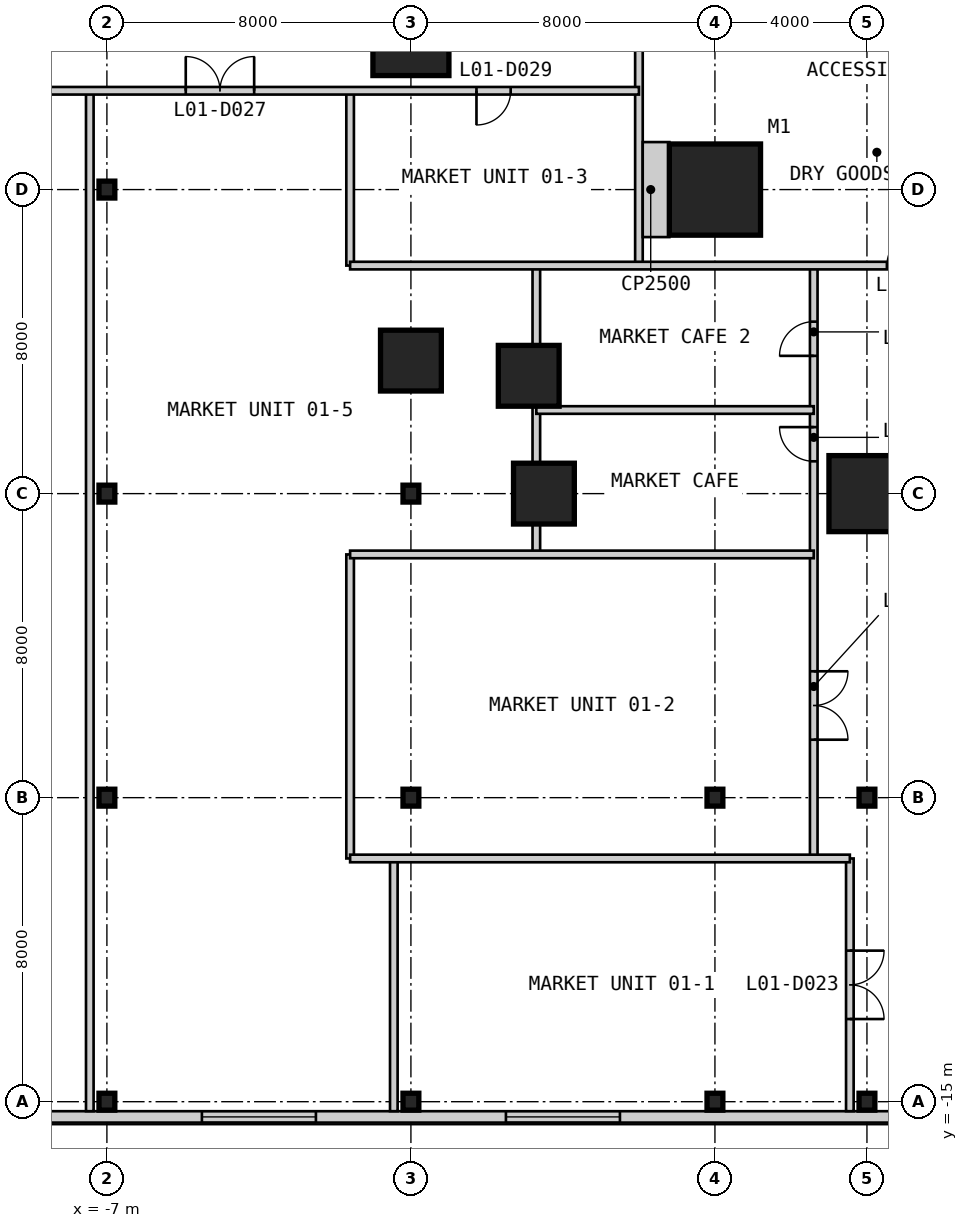
"""IFC4 building model, lengths in metres.
Left out: names, types, materials, properties, quantities, classifications, styles, units other than length and angle.
Written with IfcOpenShell. Run it as: python <this file> out.ifc"""

import sys

from ifc_helpers import new_model, si_unit, direction, frame, frame_2d, origin, origin_2d, place, context, subcontext, project, spatial, rectangle, i_section, extrude, element, fill, save


model = new_model("IFC4")
c1 = context("Model", 3, precision=1e-05, world=origin(), true_north=direction((0.0, 1.0)))
c2 = subcontext(c1, "Body", "Model", "MODEL_VIEW")
j1 = project(units=[si_unit("LENGTHUNIT", "METRE"), si_unit("PLANEANGLEUNIT", "RADIAN")], contexts=[c1])
p1 = place(None, origin())
s1 = spatial("IfcSite", under=j1, at=p1, CompositionType="ELEMENT")
p2 = place(p1, origin())
s2 = spatial("IfcBuilding", under=s1, at=p2, CompositionType="ELEMENT")
p3 = place(p2, frame((0.0, 0.0, 7.0)))
s3 = spatial("IfcBuildingStorey", under=s2, at=p3, CompositionType="ELEMENT", Elevation=7.0)
p4 = place(p3, frame((9.0, 9.0, 0.0), z_axis=(0.0, 0.0, 1.0), x_axis=(1.0, 0.0, 0.0)))
e1 = element("IfcColumn", 1, at=p4, inside=s3, PredefinedType="COLUMN", context=c2, shape_type="SweptSolid", body=[
    extrude(rectangle(XDim=2.4, YDim=2.4, at=origin_2d()), origin(), (0.0, 0.0, 1.0), 4.8),
])
p5 = place(p3, frame((4.5, 1.0, 0.0), z_axis=(0.0, 0.0, 1.0), x_axis=(1.0, 0.0, 0.0)))
e2 = element("IfcColumn", 2, at=p5, inside=s3, PredefinedType="COLUMN", context=c2, shape_type="SweptSolid", body=[
    extrude(rectangle(XDim=1.6, YDim=1.6, at=origin_2d()), origin(), (0.0, 0.0, 1.0), 4.8),
])
for number, where, z_axis, x_axis in (
    (3, (13.0, 1.0, 0.0), (0.0, 0.0, 1.0), (1.0, 0.0, 0.0)),
    (4, (1.0, 13.0, 0.0), (0.0, 0.0, 1.0), (1.0, 0.0, 0.0)),
):
    element("IfcColumn", number, at=place(p3, frame(where, z_axis=z_axis, x_axis=x_axis)), inside=s3, PredefinedType="COLUMN", context=c2, shape_type="SweptSolid", body=[
        extrude(rectangle(XDim=2.0, YDim=2.0, at=origin_2d()), origin(), (0.0, 0.0, 1.0), 4.8),
    ])
for number, where, z_axis, x_axis in (
    (5, (1.0, 4.5, 0.0), (0.0, 0.0, 1.0), (1.0, 0.0, 0.0)),
    (6, (4.1, 4.1, 0.0), (0.0, 0.0, 1.0), (1.0, 0.0, 0.0)),
):
    element("IfcColumn", number, at=place(p3, frame(where, z_axis=z_axis, x_axis=x_axis)), inside=s3, PredefinedType="COLUMN", context=c2, shape_type="SweptSolid", body=[
        extrude(rectangle(XDim=1.6, YDim=1.6, at=origin_2d()), origin(), (0.0, 0.0, 1.0), 4.8),
    ])
for number, where, z_axis, x_axis in (
    (7, (-7.0, -15.0, 0.0), (0.0, 0.0, 1.0), (1.0, 0.0, 0.0)),
    (8, (-7.0, -7.0, 0.0), (0.0, 0.0, 1.0), (1.0, 0.0, 0.0)),
    (9, (-7.0, 1.0, 0.0), (0.0, 0.0, 1.0), (1.0, 0.0, 0.0)),
    (10, (-7.0, 9.0, 0.0), (0.0, 0.0, 1.0), (1.0, 0.0, 0.0)),
    (11, (1.0, -15.0, 0.0), (0.0, 0.0, 1.0), (1.0, 0.0, 0.0)),
    (12, (1.0, -7.0, 0.0), (0.0, 0.0, 1.0), (1.0, 0.0, 0.0)),
    (13, (1.0, 1.0, 0.0), (0.0, 0.0, 1.0), (1.0, 0.0, 0.0)),
    (14, (9.0, -15.0, 0.0), (0.0, 0.0, 1.0), (1.0, 0.0, 0.0)),
    (15, (9.0, -7.0, 0.0), (0.0, 0.0, 1.0), (1.0, 0.0, 0.0)),
    (16, (13.0, -15.0, 0.0), (0.0, 0.0, 1.0), (1.0, 0.0, 0.0)),
    (17, (13.0, -7.0, 0.0), (0.0, 0.0, 1.0), (1.0, 0.0, 0.0)),
):
    element("IfcColumn", number, at=place(p3, frame(where, z_axis=z_axis, x_axis=x_axis)), inside=s3, PredefinedType="COLUMN", context=c2, shape_type="SweptSolid", body=[
        extrude(i_section(OverallWidth=0.417, OverallDepth=0.445, WebThickness=0.039, FlangeThickness=0.063, at=origin_2d()), origin(), (0.0, 0.0, 1.0), 4.8),
    ])
p6 = place(p3, frame((-15.55, -15.4, 0.0), z_axis=(0.0, 0.0, 1.0), x_axis=(1.0, 0.0, 0.0)))
e18 = element("IfcWall", 18, at=p6, inside=s3, PredefinedType="SOLIDWALL", context=c2, shape_type="SweptSolid", body=[
    extrude(rectangle(XDim=81.1, YDim=0.3, at=frame_2d((40.55, 0.0))), origin(), (0.0, 0.0, 1.0), 4.5),
])
p7 = place(p6, frame((3.05, 0.0, 0.9)))
e19 = element("IfcOpeningElement", 19, at=p7, cuts=e18, PredefinedType="OPENING", context=c2, shape_type="SweptSolid", body=[
    extrude(rectangle(XDim=3.0, YDim=2.4, at=frame_2d((1.5, 1.2))), frame((0.0, 0.16, 0.0), z_axis=(0.0, -1.0, 0.0), x_axis=(1.0, 0.0, 0.0)), (0.0, 0.0, 1.0), 0.32),
])
p8 = place(p6, frame((11.05, 0.0, 0.9)))
e20 = element("IfcOpeningElement", 20, at=p8, cuts=e18, PredefinedType="OPENING", context=c2, shape_type="SweptSolid", body=[
    extrude(rectangle(XDim=3.0, YDim=2.4, at=frame_2d((1.5, 1.2))), frame((0.0, 0.16, 0.0), z_axis=(0.0, -1.0, 0.0), x_axis=(1.0, 0.0, 0.0)), (0.0, 0.0, 1.0), 0.32),
])
p9 = place(p6, frame((19.05, 0.0, 0.9)))
e21 = element("IfcOpeningElement", 21, at=p9, cuts=e18, PredefinedType="OPENING", context=c2, shape_type="SweptSolid", body=[
    extrude(rectangle(XDim=3.0, YDim=2.4, at=frame_2d((1.5, 1.2))), frame((0.0, 0.16, 0.0), z_axis=(0.0, -1.0, 0.0), x_axis=(1.0, 0.0, 0.0)), (0.0, 0.0, 1.0), 0.32),
])
p10 = place(p6, frame((33.05, 0.0, 0.9)))
e22 = element("IfcOpeningElement", 22, at=p10, cuts=e18, PredefinedType="OPENING", context=c2, shape_type="SweptSolid", body=[
    extrude(rectangle(XDim=3.0, YDim=2.4, at=frame_2d((1.5, 1.2))), frame((0.0, 0.16, 0.0), z_axis=(0.0, -1.0, 0.0), x_axis=(1.0, 0.0, 0.0)), (0.0, 0.0, 1.0), 0.32),
])
p11 = place(p6, frame((45.05, 0.0, 0.9)))
e23 = element("IfcOpeningElement", 23, at=p11, cuts=e18, PredefinedType="OPENING", context=c2, shape_type="SweptSolid", body=[
    extrude(rectangle(XDim=3.0, YDim=2.4, at=frame_2d((1.5, 1.2))), frame((0.0, 0.16, 0.0), z_axis=(0.0, -1.0, 0.0), x_axis=(1.0, 0.0, 0.0)), (0.0, 0.0, 1.0), 0.32),
])
p12 = place(p6, frame((53.55, 0.0, 0.9)))
e24 = element("IfcOpeningElement", 24, at=p12, cuts=e18, PredefinedType="OPENING", context=c2, shape_type="SweptSolid", body=[
    extrude(rectangle(XDim=3.0, YDim=2.4, at=frame_2d((1.5, 1.2))), frame((0.0, 0.16, 0.0), z_axis=(0.0, -1.0, 0.0), x_axis=(1.0, 0.0, 0.0)), (0.0, 0.0, 1.0), 0.32),
])
p13 = place(p6, frame((59.55, 0.0, 0.9)))
e25 = element("IfcOpeningElement", 25, at=p13, cuts=e18, PredefinedType="OPENING", context=c2, shape_type="SweptSolid", body=[
    extrude(rectangle(XDim=3.0, YDim=2.4, at=frame_2d((1.5, 1.2))), frame((0.0, 0.16, 0.0), z_axis=(0.0, -1.0, 0.0), x_axis=(1.0, 0.0, 0.0)), (0.0, 0.0, 1.0), 0.32),
])
p14 = place(p6, frame((67.05, 0.0, 0.9)))
e26 = element("IfcOpeningElement", 26, at=p14, cuts=e18, PredefinedType="OPENING", context=c2, shape_type="SweptSolid", body=[
    extrude(rectangle(XDim=3.0, YDim=2.4, at=frame_2d((1.5, 1.2))), frame((0.0, 0.16, 0.0), z_axis=(0.0, -1.0, 0.0), x_axis=(1.0, 0.0, 0.0)), (0.0, 0.0, 1.0), 0.32),
])
p15 = place(p6, frame((75.05, 0.0, 0.9)))
e27 = element("IfcOpeningElement", 27, at=p15, cuts=e18, PredefinedType="OPENING", context=c2, shape_type="SweptSolid", body=[
    extrude(rectangle(XDim=3.0, YDim=2.4, at=frame_2d((1.5, 1.2))), frame((0.0, 0.16, 0.0), z_axis=(0.0, -1.0, 0.0), x_axis=(1.0, 0.0, 0.0)), (0.0, 0.0, 1.0), 0.32),
])
p16 = place(p3, frame((-7.45, -15.25, 0.0), z_axis=(0.0, 0.0, 1.0), x_axis=(0.0, 1.0, 0.0)))
e28 = element("IfcWall", 28, at=p16, inside=s3, PredefinedType="PARTITIONING", context=c2, shape_type="SweptSolid", body=[
    extrude(rectangle(XDim=26.85, YDim=0.2, at=frame_2d((13.425, 0.0))), origin(), (0.0, 0.0, 1.0), 4.5),
])
p17 = place(p3, frame((-0.6, -8.6, 0.0), z_axis=(0.0, 0.0, 1.0), x_axis=(0.0, 1.0, 0.0)))
e29 = element("IfcWall", 29, at=p17, inside=s3, PredefinedType="PARTITIONING", context=c2, shape_type="SweptSolid", body=[
    extrude(rectangle(XDim=8.0, YDim=0.2, at=frame_2d((4.0, 0.0))), origin(), (0.0, 0.0, 1.0), 4.5),
])
p18 = place(p3, frame((-0.6, 7.0, 0.0), z_axis=(0.0, 0.0, 1.0), x_axis=(0.0, 1.0, 0.0)))
e30 = element("IfcWall", 30, at=p18, inside=s3, PredefinedType="PARTITIONING", context=c2, shape_type="SweptSolid", body=[
    extrude(rectangle(XDim=4.6, YDim=0.2, at=frame_2d((2.3, 0.0))), origin(), (0.0, 0.0, 1.0), 4.5),
])
p19 = place(p3, frame((0.55, -15.25, 0.0), z_axis=(0.0, 0.0, 1.0), x_axis=(0.0, 1.0, 0.0)))
e31 = element("IfcWall", 31, at=p19, inside=s3, PredefinedType="PARTITIONING", context=c2, shape_type="SweptSolid", body=[
    extrude(rectangle(XDim=6.65, YDim=0.2, at=frame_2d((3.325, 0.0))), origin(), (0.0, 0.0, 1.0), 4.5),
])
p20 = place(p3, frame((4.3, -0.6, 0.0), z_axis=(0.0, 0.0, 1.0), x_axis=(0.0, 1.0, 0.0)))
e32 = element("IfcWall", 32, at=p20, inside=s3, PredefinedType="PARTITIONING", context=c2, shape_type="SweptSolid", body=[
    extrude(rectangle(XDim=0.8, YDim=0.2, at=frame_2d((0.4, 0.0))), origin(), (0.0, 0.0, 1.0), 4.5),
])
p21 = place(p3, frame((4.3, 1.8, 0.0), z_axis=(0.0, 0.0, 1.0), x_axis=(0.0, 1.0, 0.0)))
e33 = element("IfcWall", 33, at=p21, inside=s3, PredefinedType="PARTITIONING", context=c2, shape_type="SweptSolid", body=[
    extrude(rectangle(XDim=1.5, YDim=0.2, at=frame_2d((0.75, 0.0))), origin(), (0.0, 0.0, 1.0), 3.65),
])
p22 = place(p3, frame((4.3, 4.9, 0.0), z_axis=(0.0, 0.0, 1.0), x_axis=(0.0, 1.0, 0.0)))
e34 = element("IfcWall", 34, at=p22, inside=s3, PredefinedType="PARTITIONING", context=c2, shape_type="SweptSolid", body=[
    extrude(rectangle(XDim=2.1, YDim=0.2, at=frame_2d((1.05, 0.0))), origin(), (0.0, 0.0, 1.0), 4.5),
])
p23 = place(p3, frame((7.0, 7.0, 0.0), z_axis=(0.0, 0.0, 1.0), x_axis=(0.0, 1.0, 0.0)))
e35 = element("IfcWall", 35, at=p23, inside=s3, PredefinedType="PARTITIONING", context=c2, shape_type="SweptSolid", body=[
    extrude(rectangle(XDim=6.0, YDim=0.2, at=frame_2d((3.0, 0.0))), origin(), (0.0, 0.0, 1.0), 4.5),
])
p24 = place(p3, frame((11.6, -8.6, 0.0), z_axis=(0.0, 0.0, 1.0), x_axis=(0.0, 1.0, 0.0)))
e36 = element("IfcWall", 36, at=p24, inside=s3, PredefinedType="PARTITIONING", context=c2, shape_type="SweptSolid", body=[
    extrude(rectangle(XDim=15.6, YDim=0.2, at=frame_2d((7.8, 0.0))), origin(), (0.0, 0.0, 1.0), 4.5),
])
p25 = place(p24, frame((3.125, 0.0, 0.0)))
e37 = element("IfcOpeningElement", 37, at=p25, cuts=e36, PredefinedType="OPENING", context=c2, shape_type="SweptSolid", body=[
    extrude(rectangle(XDim=1.8, YDim=2.4, at=frame_2d((0.9, 1.2))), frame((0.0, 0.11, 0.0), z_axis=(0.0, -1.0, 0.0), x_axis=(1.0, 0.0, 0.0)), (0.0, 0.0, 1.0), 0.22),
])
p26 = place(p24, frame((10.45, 0.0, 0.0)))
e38 = element("IfcOpeningElement", 38, at=p26, cuts=e36, PredefinedType="OPENING", context=c2, shape_type="SweptSolid", body=[
    extrude(rectangle(XDim=0.9, YDim=2.2, at=frame_2d((0.45, 1.1))), frame((0.0, 0.11, 0.0), z_axis=(0.0, -1.0, 0.0), x_axis=(1.0, 0.0, 0.0)), (0.0, 0.0, 1.0), 0.22),
])
p27 = place(p24, frame((13.225, 0.0, 0.0)))
e39 = element("IfcOpeningElement", 39, at=p27, cuts=e36, PredefinedType="OPENING", context=c2, shape_type="SweptSolid", body=[
    extrude(rectangle(XDim=0.9, YDim=2.2, at=frame_2d((0.45, 1.1))), frame((0.0, 0.11, 0.0), z_axis=(0.0, -1.0, 0.0), x_axis=(1.0, 0.0, 0.0)), (0.0, 0.0, 1.0), 0.22),
])
p28 = place(p3, frame((12.55, -15.25, 0.0), z_axis=(0.0, 0.0, 1.0), x_axis=(0.0, 1.0, 0.0)))
e40 = element("IfcWall", 40, at=p28, inside=s3, PredefinedType="PARTITIONING", context=c2, shape_type="SweptSolid", body=[
    extrude(rectangle(XDim=6.65, YDim=0.2, at=frame_2d((3.325, 0.0))), origin(), (0.0, 0.0, 1.0), 4.5),
])
p29 = place(p28, frame((2.425, 0.0, 0.0)))
e41 = element("IfcOpeningElement", 41, at=p29, cuts=e40, PredefinedType="OPENING", context=c2, shape_type="SweptSolid", body=[
    extrude(rectangle(XDim=1.8, YDim=2.4, at=frame_2d((0.9, 1.2))), frame((0.0, 0.11, 0.0), z_axis=(0.0, -1.0, 0.0), x_axis=(1.0, 0.0, 0.0)), (0.0, 0.0, 1.0), 0.22),
])
p30 = place(p3, frame((-0.6, -8.6, 0.0), z_axis=(0.0, 0.0, 1.0), x_axis=(1.0, 0.0, 0.0)))
e42 = element("IfcWall", 42, at=p30, inside=s3, PredefinedType="PARTITIONING", context=c2, shape_type="SweptSolid", body=[
    extrude(rectangle(XDim=13.15, YDim=0.2, at=frame_2d((6.575, 0.0))), origin(), (0.0, 0.0, 1.0), 4.5),
])
p31 = place(p3, frame((-0.6, -0.6, 0.0), z_axis=(0.0, 0.0, 1.0), x_axis=(1.0, 0.0, 0.0)))
e43 = element("IfcWall", 43, at=p31, inside=s3, PredefinedType="PARTITIONING", context=c2, shape_type="SweptSolid", body=[
    extrude(rectangle(XDim=12.2, YDim=0.2, at=frame_2d((6.1, 0.0))), origin(), (0.0, 0.0, 1.0), 4.5),
])
p32 = place(p3, frame((4.3, 3.2, 0.0), z_axis=(0.0, 0.0, 1.0), x_axis=(1.0, 0.0, 0.0)))
e44 = element("IfcWall", 44, at=p32, inside=s3, PredefinedType="PARTITIONING", context=c2, shape_type="SweptSolid", body=[
    extrude(rectangle(XDim=7.3, YDim=0.2, at=frame_2d((3.65, 0.0))), origin(), (0.0, 0.0, 1.0), 4.5),
])
p33 = place(p3, frame((-0.6, 7.0, 0.0), z_axis=(0.0, 0.0, 1.0), x_axis=(1.0, 0.0, 0.0)))
e45 = element("IfcWall", 45, at=p33, inside=s3, PredefinedType="PARTITIONING", context=c2, shape_type="SweptSolid", body=[
    extrude(rectangle(XDim=17.0, YDim=0.2, at=frame_2d((8.5, 0.0))), origin(), (0.0, 0.0, 1.0), 4.5),
])
p34 = place(p33, frame((14.125, 0.0, 0.0)))
e46 = element("IfcOpeningElement", 46, at=p34, cuts=e45, PredefinedType="OPENING", context=c2, shape_type="SweptSolid", body=[
    extrude(rectangle(XDim=0.9, YDim=2.2, at=frame_2d((0.45, 1.1))), frame((0.0, 0.11, 0.0), z_axis=(0.0, -1.0, 0.0), x_axis=(1.0, 0.0, 0.0)), (0.0, 0.0, 1.0), 0.22),
])
p35 = place(p3, frame((-15.25, 11.6, 0.0), z_axis=(0.0, 0.0, 1.0), x_axis=(1.0, 0.0, 0.0)))
e47 = element("IfcWall", 47, at=p35, inside=s3, PredefinedType="PARTITIONING", context=c2, shape_type="SweptSolid", body=[
    extrude(rectangle(XDim=22.25, YDim=0.2, at=frame_2d((11.125, 0.0))), origin(), (0.0, 0.0, 1.0), 4.5),
])
p36 = place(p35, frame((10.325, 0.0, 0.0)))
e48 = element("IfcOpeningElement", 48, at=p36, cuts=e47, PredefinedType="OPENING", context=c2, shape_type="SweptSolid", body=[
    extrude(rectangle(XDim=1.8, YDim=2.4, at=frame_2d((0.9, 1.2))), frame((0.0, 0.11, 0.0), z_axis=(0.0, -1.0, 0.0), x_axis=(1.0, 0.0, 0.0)), (0.0, 0.0, 1.0), 0.22),
])
p37 = place(p35, frame((3.025, 0.0, 0.0)))
e49 = element("IfcOpeningElement", 49, at=p37, cuts=e47, PredefinedType="OPENING", context=c2, shape_type="SweptSolid", body=[
    extrude(rectangle(XDim=1.8, YDim=2.4, at=frame_2d((0.9, 1.2))), frame((0.0, 0.11, 0.0), z_axis=(0.0, -1.0, 0.0), x_axis=(1.0, 0.0, 0.0)), (0.0, 0.0, 1.0), 0.22),
])
p38 = place(p35, frame((17.975, 0.0, 0.0)))
e50 = element("IfcOpeningElement", 50, at=p38, cuts=e47, PredefinedType="OPENING", context=c2, shape_type="SweptSolid", body=[
    extrude(rectangle(XDim=0.9, YDim=2.2, at=frame_2d((0.45, 1.1))), frame((0.0, 0.11, 0.0), z_axis=(0.0, -1.0, 0.0), x_axis=(1.0, 0.0, 0.0)), (0.0, 0.0, 1.0), 0.22),
])
p39 = place(p3, frame((7.1, 9.0, 0.0), z_axis=(0.0, 0.0, 1.0), x_axis=(1.0, 0.0, 0.0)))
e51 = element("IfcWall", 51, at=p39, inside=s3, PredefinedType="PARTITIONING", context=c2, shape_type="SweptSolid", body=[
    extrude(rectangle(XDim=0.7, YDim=2.5, at=frame_2d((0.35, 0.0))), origin(), (0.0, 0.0, 1.0), 4.5),
])
p40 = place(p8, origin())
e52 = element("IfcWindow", 52, at=p40, inside=s3, PartitioningType="SINGLE_PANEL", PredefinedType="WINDOW", context=c2, shape_type="SweptSolid", body=[
    extrude(rectangle(XDim=3.0, YDim=2.4, at=frame_2d((1.5, 1.2))), frame((0.0, 0.03, 0.0), z_axis=(0.0, -1.0, 0.0), x_axis=(1.0, 0.0, 0.0)), (0.0, 0.0, 1.0), 0.06),
])
fill(e20, e52)
p41 = place(p9, origin())
e53 = element("IfcWindow", 53, at=p41, inside=s3, PartitioningType="SINGLE_PANEL", PredefinedType="WINDOW", context=c2, shape_type="SweptSolid", body=[
    extrude(rectangle(XDim=3.0, YDim=2.4, at=frame_2d((1.5, 1.2))), frame((0.0, 0.03, 0.0), z_axis=(0.0, -1.0, 0.0), x_axis=(1.0, 0.0, 0.0)), (0.0, 0.0, 1.0), 0.06),
])
fill(e21, e53)
p42 = place(p29, frame((1.8, 0.0, 0.0), z_axis=(0.0, 0.0, 1.0), x_axis=(-1.0, 0.0, 0.0)))
e54 = element("IfcDoor", 54, at=p42, inside=s3, OperationType="DOUBLE_DOOR_SINGLE_SWING", PredefinedType="DOOR", context=c2, shape_type="SweptSolid", body=[
    extrude(rectangle(XDim=1.8, YDim=2.4, at=frame_2d((0.9, 1.2))), frame((0.0, 0.025, 0.0), z_axis=(0.0, -1.0, 0.0), x_axis=(1.0, 0.0, 0.0)), (0.0, 0.0, 1.0), 0.05),
])
fill(e41, e54)
p43 = place(p25, frame((1.8, 0.0, 0.0), z_axis=(0.0, 0.0, 1.0), x_axis=(-1.0, 0.0, 0.0)))
e55 = element("IfcDoor", 55, at=p43, inside=s3, OperationType="DOUBLE_DOOR_SINGLE_SWING", PredefinedType="DOOR", context=c2, shape_type="SweptSolid", body=[
    extrude(rectangle(XDim=1.8, YDim=2.4, at=frame_2d((0.9, 1.2))), frame((0.0, 0.025, 0.0), z_axis=(0.0, -1.0, 0.0), x_axis=(1.0, 0.0, 0.0)), (0.0, 0.0, 1.0), 0.05),
])
fill(e37, e55)
p44 = place(p26, origin())
e56 = element("IfcDoor", 56, at=p44, inside=s3, OperationType="SINGLE_SWING_RIGHT", PredefinedType="DOOR", context=c2, shape_type="SweptSolid", body=[
    extrude(rectangle(XDim=0.9, YDim=2.2, at=frame_2d((0.45, 1.1))), frame((0.0, 0.025, 0.0), z_axis=(0.0, -1.0, 0.0), x_axis=(1.0, 0.0, 0.0)), (0.0, 0.0, 1.0), 0.05),
])
fill(e38, e56)
p45 = place(p27, origin())
e57 = element("IfcDoor", 57, at=p45, inside=s3, OperationType="SINGLE_SWING_LEFT", PredefinedType="DOOR", context=c2, shape_type="SweptSolid", body=[
    extrude(rectangle(XDim=0.9, YDim=2.2, at=frame_2d((0.45, 1.1))), frame((0.0, 0.025, 0.0), z_axis=(0.0, -1.0, 0.0), x_axis=(1.0, 0.0, 0.0)), (0.0, 0.0, 1.0), 0.05),
])
fill(e39, e57)
p46 = place(p36, origin())
e58 = element("IfcDoor", 58, at=p46, inside=s3, OperationType="DOUBLE_DOOR_SINGLE_SWING", PredefinedType="DOOR", context=c2, shape_type="SweptSolid", body=[
    extrude(rectangle(XDim=1.8, YDim=2.4, at=frame_2d((0.9, 1.2))), frame((0.0, 0.025, 0.0), z_axis=(0.0, -1.0, 0.0), x_axis=(1.0, 0.0, 0.0)), (0.0, 0.0, 1.0), 0.05),
])
fill(e48, e58)
p47 = place(p38, frame((0.9, 0.0, 0.0), z_axis=(0.0, 0.0, 1.0), x_axis=(-1.0, 0.0, 0.0)))
e59 = element("IfcDoor", 59, at=p47, inside=s3, OperationType="SINGLE_SWING_RIGHT", PredefinedType="DOOR", context=c2, shape_type="SweptSolid", body=[
    extrude(rectangle(XDim=0.9, YDim=2.2, at=frame_2d((0.45, 1.1))), frame((0.0, 0.025, 0.0), z_axis=(0.0, -1.0, 0.0), x_axis=(1.0, 0.0, 0.0)), (0.0, 0.0, 1.0), 0.05),
])
fill(e50, e59)
p48 = place(p34, origin())
e60 = element("IfcDoor", 60, at=p48, inside=s3, OperationType="SINGLE_SWING_RIGHT", PredefinedType="DOOR", context=c2, shape_type="SweptSolid", body=[
    extrude(rectangle(XDim=0.9, YDim=2.2, at=frame_2d((0.45, 1.1))), frame((0.0, 0.025, 0.0), z_axis=(0.0, -1.0, 0.0), x_axis=(1.0, 0.0, 0.0)), (0.0, 0.0, 1.0), 0.05),
])
fill(e46, e60)
save(model, sys.argv[1])
